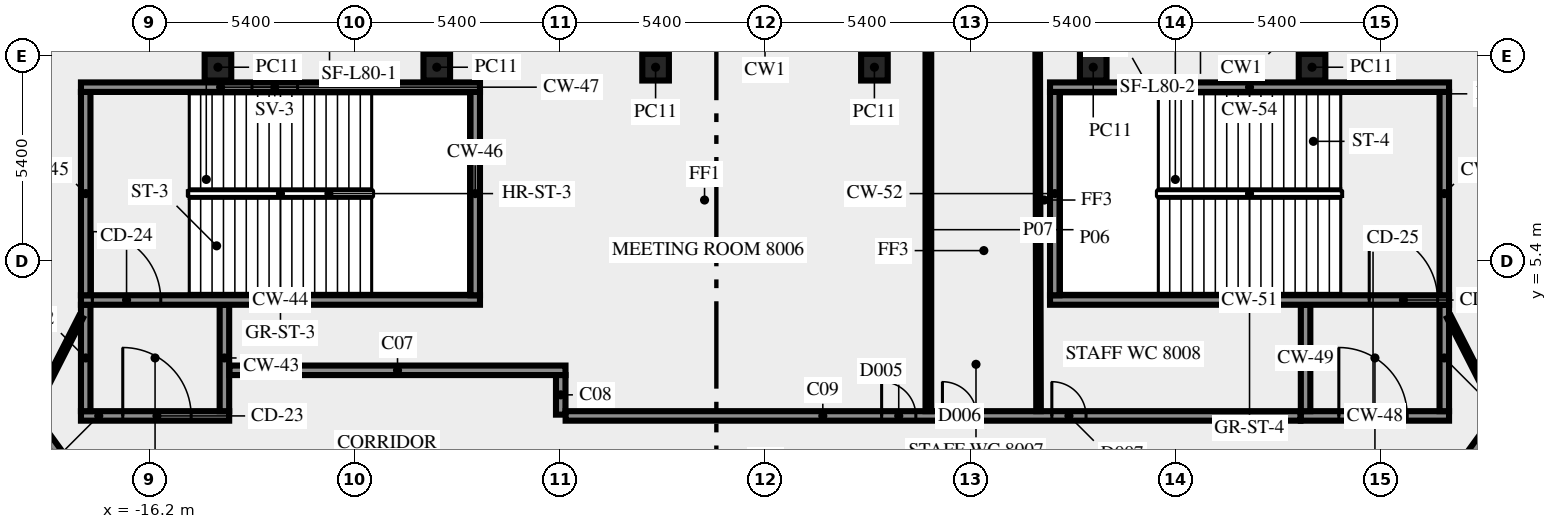
"""IFC4 building model, lengths in metres.
Left out: names, types, materials, properties, quantities, classifications, styles, units other than length and angle.
Written with IfcOpenShell. Run it as: python <this file> out.ifc"""

import sys

from ifc_helpers import new_model, si_unit, direction, frame, frame_2d, origin, origin_2d, place, context, subcontext, project, spatial, rectangle, extrude, element, fill, save


model = new_model("IFC4")
c1 = context("Model", 3, precision=1e-05, world=origin(), true_north=direction((0.0, 1.0)))
c2 = subcontext(c1, "Body", "Model", "MODEL_VIEW")
j1 = project(units=[si_unit("LENGTHUNIT", "METRE"), si_unit("PLANEANGLEUNIT", "RADIAN")], contexts=[c1])
p1 = place(None, origin())
s1 = spatial("IfcSite", under=j1, at=p1, CompositionType="ELEMENT")
p2 = place(p1, origin())
s2 = spatial("IfcBuilding", under=s1, at=p2, CompositionType="ELEMENT")
p3 = place(p2, frame((0.0, 0.0, 343.0)))
s3 = spatial("IfcBuildingStorey", under=s2, at=p3, CompositionType="ELEMENT", Elevation=343.0)
for number, where, z_axis, x_axis in (
    (1, (14.395, 10.5, 0.0), (0.0, 0.0, 1.0), (-1.0, 0.0, 0.0)),
    (2, (8.637, 10.5, 0.0), (0.0, 0.0, 1.0), (-1.0, 0.0, 0.0)),
    (3, (2.879, 10.5, 0.0), (0.0, 0.0, 1.0), (-1.0, 0.0, 0.0)),
    (4, (-2.879, 10.5, 0.0), (0.0, 0.0, 1.0), (-1.0, 0.0, 0.0)),
    (5, (-8.637, 10.5, 0.0), (0.0, 0.0, 1.0), (-1.0, 0.0, 0.0)),
    (6, (-14.395, 10.5, 0.0), (0.0, 0.0, 1.0), (-1.0, 0.0, 0.0)),
):
    element("IfcColumn", number, at=place(p3, frame(where, z_axis=z_axis, x_axis=x_axis)), inside=s3, PredefinedType="COLUMN", context=c2, shape_type="SweptSolid", body=[
        extrude(rectangle(XDim=0.7, YDim=0.7, at=origin_2d()), origin(), (0.0, 0.0, 1.0), 3.65),
    ])
p4 = place(p3, frame((-18.0, 1.325, 0.0), z_axis=(0.0, 0.0, 1.0), x_axis=(1.0, 0.0, 0.0)))
e7 = element("IfcWall", 7, at=p4, inside=s3, PredefinedType="SHEAR", context=c2, shape_type="SweptSolid", body=[
    extrude(rectangle(XDim=3.9, YDim=0.25, at=frame_2d((1.95, 0.0))), origin(), (0.0, 0.0, 1.0), 3.65),
])
p5 = place(p4, frame((1.1, 0.0, 0.0)))
e8 = element("IfcOpeningElement", 8, at=p5, cuts=e7, PredefinedType="OPENING", context=c2, shape_type="SweptSolid", body=[
    extrude(rectangle(XDim=1.8, YDim=2.1, at=frame_2d((0.9, 1.05))), frame((0.0, 0.135, 0.0), z_axis=(0.0, -1.0, 0.0), x_axis=(1.0, 0.0, 0.0)), (0.0, 0.0, 1.0), 0.27),
])
for number, where, z_axis, x_axis in (
    (9, (-17.875, 1.45, 0.0), (0.0, 0.0, 1.0), (0.0, 1.0, 0.0)),
    (10, (-14.225, 1.45, 0.0), (0.0, 0.0, 1.0), (0.0, 1.0, 0.0)),
):
    element("IfcWall", number, at=place(p3, frame(where, z_axis=z_axis, x_axis=x_axis)), inside=s3, PredefinedType="SHEAR", context=c2, shape_type="SweptSolid", body=[
        extrude(rectangle(XDim=2.8, YDim=0.25, at=frame_2d((1.4, 0.0))), origin(), (0.0, 0.0, 1.0), 3.65),
    ])
p6 = place(p3, frame((-18.0, 4.375, 0.0), z_axis=(0.0, 0.0, 1.0), x_axis=(1.0, 0.0, 0.0)))
e11 = element("IfcWall", 11, at=p6, inside=s3, PredefinedType="SHEAR", context=c2, shape_type="SweptSolid", body=[
    extrude(rectangle(XDim=10.5, YDim=0.25, at=frame_2d((5.25, 0.0))), origin(), (0.0, 0.0, 1.0), 3.65),
])
p7 = place(p6, frame((0.3, 0.0, 0.0)))
e12 = element("IfcOpeningElement", 12, at=p7, cuts=e11, PredefinedType="OPENING", context=c2, shape_type="SweptSolid", body=[
    extrude(rectangle(XDim=1.8, YDim=2.1, at=frame_2d((0.9, 1.05))), frame((0.0, 0.135, 0.0), z_axis=(0.0, -1.0, 0.0), x_axis=(1.0, 0.0, 0.0)), (0.0, 0.0, 1.0), 0.27),
])
for number, where, z_axis, x_axis in (
    (13, (-17.875, 4.5, 0.0), (0.0, 0.0, 1.0), (0.0, 1.0, 0.0)),
    (14, (-7.625, 4.5, 0.0), (0.0, 0.0, 1.0), (0.0, 1.0, 0.0)),
):
    element("IfcWall", number, at=place(p3, frame(where, z_axis=z_axis, x_axis=x_axis)), inside=s3, PredefinedType="SHEAR", context=c2, shape_type="SweptSolid", body=[
        extrude(rectangle(XDim=5.35, YDim=0.25, at=frame_2d((2.675, 0.0))), origin(), (0.0, 0.0, 1.0), 3.65),
    ])
p8 = place(p3, frame((-18.0, 9.975, 0.0), z_axis=(0.0, 0.0, 1.0), x_axis=(1.0, 0.0, 0.0)))
e15 = element("IfcWall", 15, at=p8, inside=s3, PredefinedType="SHEAR", context=c2, shape_type="SweptSolid", body=[
    extrude(rectangle(XDim=10.5, YDim=0.25, at=frame_2d((5.25, 0.0))), origin(), (0.0, 0.0, 1.0), 3.65),
])
p9 = place(p8, frame((4.5, 0.0, 1.0)))
e16 = element("IfcOpeningElement", 16, at=p9, cuts=e15, PredefinedType="OPENING", context=c2, shape_type="SweptSolid", body=[
    extrude(rectangle(XDim=1.2, YDim=1.2, at=frame_2d((0.6, 0.6))), frame((0.0, 0.135, 0.0), z_axis=(0.0, -1.0, 0.0), x_axis=(1.0, 0.0, 0.0)), (0.0, 0.0, 1.0), 0.27),
])
p10 = place(p3, frame((14.1, 1.325, 0.0), z_axis=(0.0, 0.0, 1.0), x_axis=(1.0, 0.0, 0.0)))
e17 = element("IfcWall", 17, at=p10, inside=s3, PredefinedType="SHEAR", context=c2, shape_type="SweptSolid", body=[
    extrude(rectangle(XDim=3.9, YDim=0.25, at=frame_2d((1.95, 0.0))), origin(), (0.0, 0.0, 1.0), 3.65),
])
p11 = place(p10, frame((1.0, 0.0, 0.0)))
e18 = element("IfcOpeningElement", 18, at=p11, cuts=e17, PredefinedType="OPENING", context=c2, shape_type="SweptSolid", body=[
    extrude(rectangle(XDim=1.8, YDim=2.1, at=frame_2d((0.9, 1.05))), frame((0.0, 0.135, 0.0), z_axis=(0.0, -1.0, 0.0), x_axis=(1.0, 0.0, 0.0)), (0.0, 0.0, 1.0), 0.27),
])
for number, where, z_axis, x_axis in (
    (19, (14.225, 1.45, 0.0), (0.0, 0.0, 1.0), (0.0, 1.0, 0.0)),
    (20, (17.875, 1.45, 0.0), (0.0, 0.0, 1.0), (0.0, 1.0, 0.0)),
):
    element("IfcWall", number, at=place(p3, frame(where, z_axis=z_axis, x_axis=x_axis)), inside=s3, PredefinedType="SHEAR", context=c2, shape_type="SweptSolid", body=[
        extrude(rectangle(XDim=2.8, YDim=0.25, at=frame_2d((1.4, 0.0))), origin(), (0.0, 0.0, 1.0), 3.65),
    ])
p12 = place(p3, frame((7.5, 4.375, 0.0), z_axis=(0.0, 0.0, 1.0), x_axis=(1.0, 0.0, 0.0)))
e21 = element("IfcWall", 21, at=p12, inside=s3, PredefinedType="SHEAR", context=c2, shape_type="SweptSolid", body=[
    extrude(rectangle(XDim=10.5, YDim=0.25, at=frame_2d((5.25, 0.0))), origin(), (0.0, 0.0, 1.0), 3.65),
])
p13 = place(p12, frame((8.4, 0.0, 0.0)))
e22 = element("IfcOpeningElement", 22, at=p13, cuts=e21, PredefinedType="OPENING", context=c2, shape_type="SweptSolid", body=[
    extrude(rectangle(XDim=1.8, YDim=2.1, at=frame_2d((0.9, 1.05))), frame((0.0, 0.135, 0.0), z_axis=(0.0, -1.0, 0.0), x_axis=(1.0, 0.0, 0.0)), (0.0, 0.0, 1.0), 0.27),
])
for number, where, z_axis, x_axis in (
    (23, (7.625, 4.5, 0.0), (0.0, 0.0, 1.0), (0.0, 1.0, 0.0)),
    (24, (17.875, 4.5, 0.0), (0.0, 0.0, 1.0), (0.0, 1.0, 0.0)),
):
    element("IfcWall", number, at=place(p3, frame(where, z_axis=z_axis, x_axis=x_axis)), inside=s3, PredefinedType="SHEAR", context=c2, shape_type="SweptSolid", body=[
        extrude(rectangle(XDim=5.35, YDim=0.25, at=frame_2d((2.675, 0.0))), origin(), (0.0, 0.0, 1.0), 3.65),
    ])
p14 = place(p3, frame((7.5, 9.975, 0.0), z_axis=(0.0, 0.0, 1.0), x_axis=(1.0, 0.0, 0.0)))
e25 = element("IfcWall", 25, at=p14, inside=s3, PredefinedType="SHEAR", context=c2, shape_type="SweptSolid", body=[
    extrude(rectangle(XDim=10.5, YDim=0.25, at=frame_2d((5.25, 0.0))), origin(), (0.0, 0.0, 1.0), 3.65),
])
p15 = place(p14, frame((2.0, 0.0, 1.0)))
e26 = element("IfcOpeningElement", 26, at=p15, cuts=e25, PredefinedType="OPENING", context=c2, shape_type="SweptSolid", body=[
    extrude(rectangle(XDim=1.2, YDim=1.2, at=frame_2d((0.6, 0.6))), frame((0.0, 0.135, 0.0), z_axis=(0.0, -1.0, 0.0), x_axis=(1.0, 0.0, 0.0)), (0.0, 0.0, 1.0), 0.27),
])
p16 = place(p3, frame((17.545, -1.125, 0.0), z_axis=(0.0, 0.0, 1.0), x_axis=(0.58779555165, 0.809009511354, 0.0)))
e27 = element("IfcWall", 27, at=p16, inside=s3, PredefinedType="SOLIDWALL", context=c2, shape_type="SweptSolid", body=[
    extrude(rectangle(XDim=18.103, YDim=0.25, at=frame_2d((9.052, 0.0))), origin(), (0.0, 0.0, 1.0), 3.65),
])
p17 = place(p16, frame((16.728, 0.0, 0.0)))
e28 = element("IfcOpeningElement", 28, at=p17, cuts=e27, PredefinedType="OPENING", context=c2, shape_type="SweptSolid", body=[
    extrude(rectangle(XDim=0.9, YDim=2.1, at=frame_2d((0.45, 1.05))), frame((0.0, 0.135, 0.0), z_axis=(0.0, -1.0, 0.0), x_axis=(1.0, 0.0, 0.0)), (0.0, 0.0, 1.0), 0.27),
])
p18 = place(p3, frame((-28.039, 13.319, 0.0), z_axis=(0.0, 0.0, 1.0), x_axis=(0.587791911753, -0.809012155952, 0.0)))
e29 = element("IfcWall", 29, at=p18, inside=s3, PredefinedType="SOLIDWALL", context=c2, shape_type="SweptSolid", body=[
    extrude(rectangle(XDim=17.853, YDim=0.25, at=frame_2d((8.927, 0.0))), origin(), (0.0, 0.0, 1.0), 3.65),
])
p19 = place(p18, frame((13.512, 0.0, 0.0)))
e30 = element("IfcOpeningElement", 30, at=p19, cuts=e29, PredefinedType="OPENING", context=c2, shape_type="SweptSolid", body=[
    extrude(rectangle(XDim=0.9, YDim=2.1, at=frame_2d((0.45, 1.05))), frame((0.0, 0.135, 0.0), z_axis=(0.0, -1.0, 0.0), x_axis=(1.0, 0.0, 0.0)), (0.0, 0.0, 1.0), 0.27),
])
p20 = place(p3, frame((-14.09, 2.525, 0.0), z_axis=(0.0, 0.0, 1.0), x_axis=(1.0, 0.0, 0.0)))
e31 = element("IfcWall", 31, at=p20, inside=s3, PredefinedType="SOLIDWALL", context=c2, shape_type="SweptSolid", body=[
    extrude(rectangle(XDim=8.84, YDim=0.25, at=frame_2d((4.42, 0.0))), origin(), (0.0, 0.0, 1.0), 3.65),
])
p21 = place(p3, frame((-5.375, 2.4, 0.0), z_axis=(0.0, 0.0, 1.0), x_axis=(0.0, -1.0, 0.0)))
e32 = element("IfcWall", 32, at=p21, inside=s3, PredefinedType="SOLIDWALL", context=c2, shape_type="SweptSolid", body=[
    extrude(rectangle(XDim=1.041, YDim=0.25, at=frame_2d((0.521, 0.0))), origin(), (0.0, 0.0, 1.0), 3.65),
])
p22 = place(p3, frame((-5.246, 1.325, 0.0), z_axis=(0.0, 0.0, 1.0), x_axis=(1.0, 0.0, 0.0)))
e33 = element("IfcWall", 33, at=p22, inside=s3, PredefinedType="SOLIDWALL", context=c2, shape_type="SweptSolid", body=[
    extrude(rectangle(XDim=19.336, YDim=0.25, at=frame_2d((9.668, 0.0))), origin(), (0.0, 0.0, 1.0), 3.65),
])
p23 = place(p22, frame((8.315, 0.0, 0.0)))
e34 = element("IfcOpeningElement", 34, at=p23, cuts=e33, PredefinedType="OPENING", context=c2, shape_type="SweptSolid", body=[
    extrude(rectangle(XDim=0.9, YDim=2.1, at=frame_2d((0.45, 1.05))), frame((0.0, 0.135, 0.0), z_axis=(0.0, -1.0, 0.0), x_axis=(1.0, 0.0, 0.0)), (0.0, 0.0, 1.0), 0.27),
])
p24 = place(p22, frame((9.915, 0.0, 0.0)))
e35 = element("IfcOpeningElement", 35, at=p24, cuts=e33, PredefinedType="OPENING", context=c2, shape_type="SweptSolid", body=[
    extrude(rectangle(XDim=0.9, YDim=2.1, at=frame_2d((0.45, 1.05))), frame((0.0, 0.135, 0.0), z_axis=(0.0, -1.0, 0.0), x_axis=(1.0, 0.0, 0.0)), (0.0, 0.0, 1.0), 0.27),
])
p25 = place(p22, frame((12.794, 0.0, 0.0)))
e36 = element("IfcOpeningElement", 36, at=p25, cuts=e33, PredefinedType="OPENING", context=c2, shape_type="SweptSolid", body=[
    extrude(rectangle(XDim=0.9, YDim=2.1, at=frame_2d((0.45, 1.05))), frame((0.0, 0.135, 0.0), z_axis=(0.0, -1.0, 0.0), x_axis=(1.0, 0.0, 0.0)), (0.0, 0.0, 1.0), 0.27),
])
p26 = place(p3, frame((4.299, 1.45, 0.0), z_axis=(0.0, 0.0, 1.0), x_axis=(0.0, 1.0, 0.0)))
e37 = element("IfcWall", 37, at=p26, inside=s3, PredefinedType="PARTITIONING", context=c2, shape_type="SweptSolid", body=[
    extrude(rectangle(XDim=9.55, YDim=0.15, at=frame_2d((4.775, 0.0))), origin(), (0.0, 0.0, 1.0), 2.95),
])
p27 = place(p3, frame((7.198, 1.45, 0.0), z_axis=(0.0, 0.0, 1.0), x_axis=(-0.002377476217, 0.999997173799, 0.0)))
e38 = element("IfcWall", 38, at=p27, inside=s3, PredefinedType="PARTITIONING", context=c2, shape_type="SweptSolid", body=[
    extrude(rectangle(XDim=9.55, YDim=0.12, at=frame_2d((4.775, 0.0))), origin(), (0.0, 0.0, 1.0), 2.95),
])
for number, where, z_axis, x_axis in (
    (39, (18.0, 3.925, 0.0), (0.0, 0.0, 1.0), (0.454, -0.891, 0.0)),
    (40, (-19.261, 1.45, 0.0), (0.0, 0.0, 1.0), (0.454, 0.891, 0.0)),
):
    element("IfcWall", number, at=place(p3, frame(where, z_axis=z_axis, x_axis=x_axis)), inside=s3, PredefinedType="PARTITIONING", context=c2, shape_type="SweptSolid", body=[
        extrude(rectangle(XDim=2.778, YDim=0.12, at=frame_2d((1.389, 0.0))), origin(), (0.0, 0.0, 1.0), 3.65),
    ])
p28 = place(p5, origin())
e41 = element("IfcDoor", 41, at=p28, inside=s3, OperationType="DOUBLE_DOOR_SINGLE_SWING", PredefinedType="DOOR", context=c2, shape_type="SweptSolid", body=[
    extrude(rectangle(XDim=1.8, YDim=2.1, at=frame_2d((0.9, 1.05))), frame((0.0, 0.025, 0.0), z_axis=(0.0, -1.0, 0.0), x_axis=(1.0, 0.0, 0.0)), (0.0, 0.0, 1.0), 0.05),
])
fill(e8, e41)
p29 = place(p7, origin())
e42 = element("IfcDoor", 42, at=p29, inside=s3, OperationType="DOUBLE_DOOR_SINGLE_SWING", PredefinedType="DOOR", context=c2, shape_type="SweptSolid", body=[
    extrude(rectangle(XDim=1.8, YDim=2.1, at=frame_2d((0.9, 1.05))), frame((0.0, 0.025, 0.0), z_axis=(0.0, -1.0, 0.0), x_axis=(1.0, 0.0, 0.0)), (0.0, 0.0, 1.0), 0.05),
])
fill(e12, e42)
p30 = place(p9, origin())
e43 = element("IfcWindow", 43, at=p30, inside=s3, PartitioningType="SINGLE_PANEL", PredefinedType="WINDOW", context=c2, shape_type="SweptSolid", body=[
    extrude(rectangle(XDim=1.2, YDim=1.2, at=frame_2d((0.6, 0.6))), frame((0.0, 0.03, 0.0), z_axis=(0.0, -1.0, 0.0), x_axis=(1.0, 0.0, 0.0)), (0.0, 0.0, 1.0), 0.06),
])
fill(e16, e43)
p31 = place(p11, origin())
e44 = element("IfcDoor", 44, at=p31, inside=s3, OperationType="DOUBLE_DOOR_SINGLE_SWING", PredefinedType="DOOR", context=c2, shape_type="SweptSolid", body=[
    extrude(rectangle(XDim=1.8, YDim=2.1, at=frame_2d((0.9, 1.05))), frame((0.0, 0.025, 0.0), z_axis=(0.0, -1.0, 0.0), x_axis=(1.0, 0.0, 0.0)), (0.0, 0.0, 1.0), 0.05),
])
fill(e18, e44)
p32 = place(p13, origin())
e45 = element("IfcDoor", 45, at=p32, inside=s3, OperationType="DOUBLE_DOOR_SINGLE_SWING", PredefinedType="DOOR", context=c2, shape_type="SweptSolid", body=[
    extrude(rectangle(XDim=1.8, YDim=2.1, at=frame_2d((0.9, 1.05))), frame((0.0, 0.025, 0.0), z_axis=(0.0, -1.0, 0.0), x_axis=(1.0, 0.0, 0.0)), (0.0, 0.0, 1.0), 0.05),
])
fill(e22, e45)
p33 = place(p15, origin())
e46 = element("IfcWindow", 46, at=p33, inside=s3, PartitioningType="SINGLE_PANEL", PredefinedType="WINDOW", context=c2, shape_type="SweptSolid", body=[
    extrude(rectangle(XDim=1.2, YDim=1.2, at=frame_2d((0.6, 0.6))), frame((0.0, 0.03, 0.0), z_axis=(0.0, -1.0, 0.0), x_axis=(1.0, 0.0, 0.0)), (0.0, 0.0, 1.0), 0.06),
])
fill(e26, e46)
p34 = place(p23, origin())
e47 = element("IfcDoor", 47, at=p34, inside=s3, OperationType="SINGLE_SWING_RIGHT", PredefinedType="DOOR", context=c2, shape_type="SweptSolid", body=[
    extrude(rectangle(XDim=0.9, YDim=2.1, at=frame_2d((0.45, 1.05))), frame((0.0, 0.025, 0.0), z_axis=(0.0, -1.0, 0.0), x_axis=(1.0, 0.0, 0.0)), (0.0, 0.0, 1.0), 0.05),
])
fill(e34, e47)
p35 = place(p24, origin())
e48 = element("IfcDoor", 48, at=p35, inside=s3, OperationType="SINGLE_SWING_LEFT", PredefinedType="DOOR", context=c2, shape_type="SweptSolid", body=[
    extrude(rectangle(XDim=0.9, YDim=2.1, at=frame_2d((0.45, 1.05))), frame((0.0, 0.025, 0.0), z_axis=(0.0, -1.0, 0.0), x_axis=(1.0, 0.0, 0.0)), (0.0, 0.0, 1.0), 0.05),
])
fill(e35, e48)
p36 = place(p25, origin())
e49 = element("IfcDoor", 49, at=p36, inside=s3, OperationType="SINGLE_SWING_LEFT", PredefinedType="DOOR", context=c2, shape_type="SweptSolid", body=[
    extrude(rectangle(XDim=0.9, YDim=2.1, at=frame_2d((0.45, 1.05))), frame((0.0, 0.025, 0.0), z_axis=(0.0, -1.0, 0.0), x_axis=(1.0, 0.0, 0.0)), (0.0, 0.0, 1.0), 0.05),
])
fill(e36, e49)
save(model, sys.argv[1])
